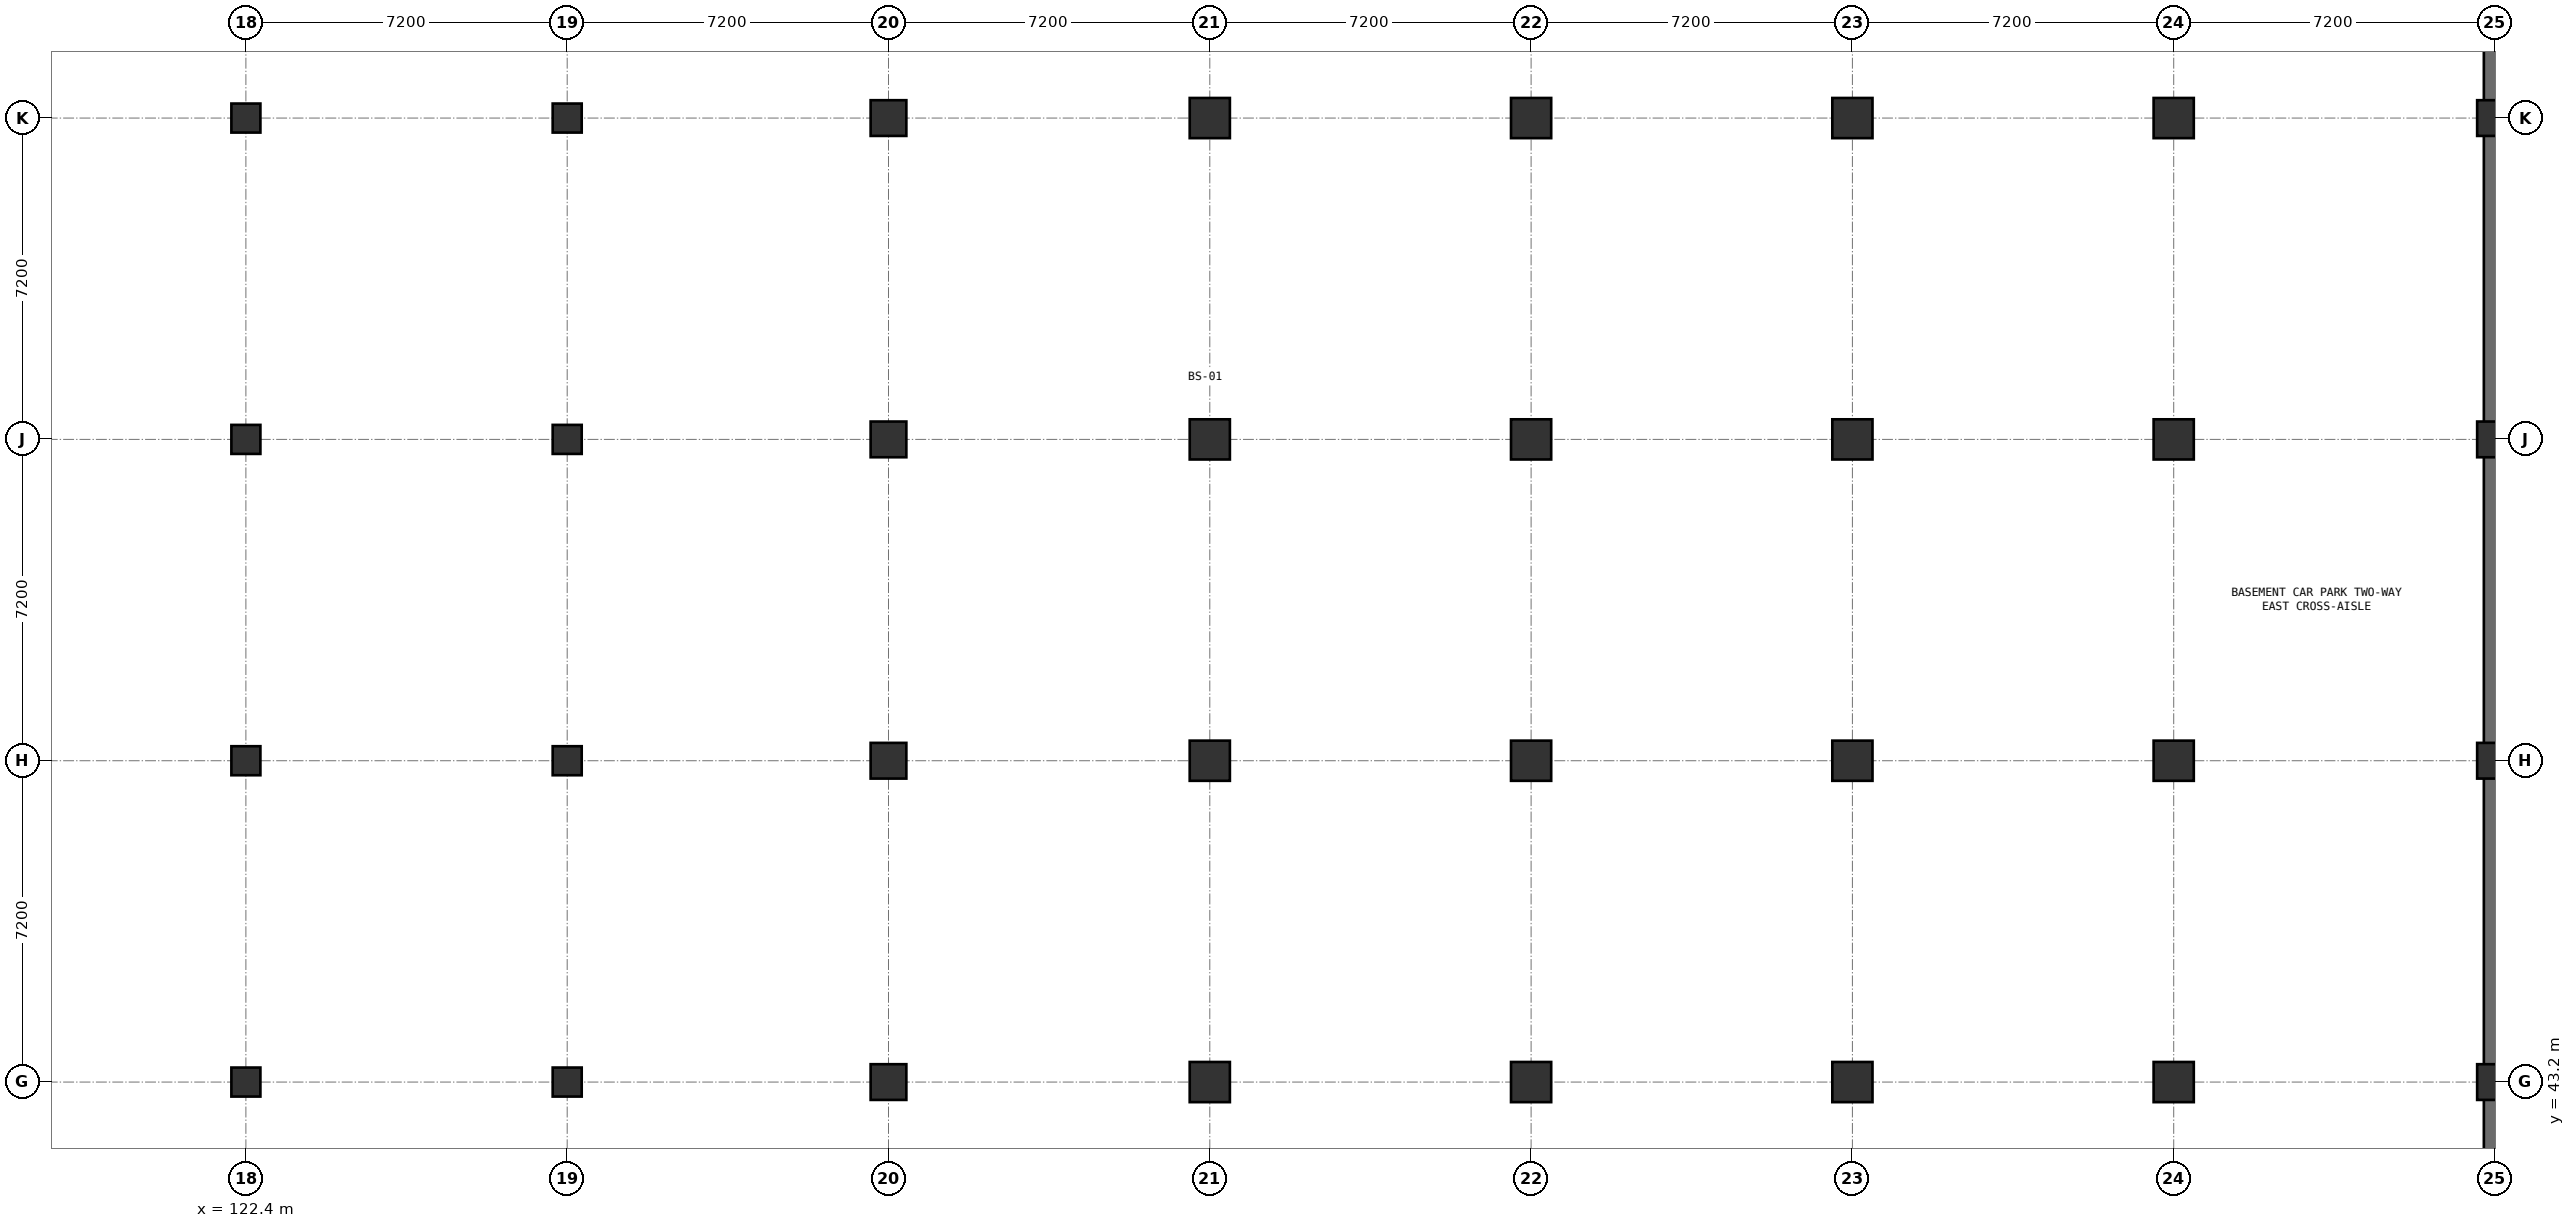
"""IFC4 building model, lengths in metres.
Left out: names, types, materials, properties, quantities, classifications, styles, units other than length and angle.
Written with IfcOpenShell. Run it as: python <this file> out.ifc"""

import sys

from ifc_helpers import new_model, si_unit, direction, frame, frame_2d, origin, origin_2d, place, context, subcontext, project, spatial, rectangle, extrude, element, save


model = new_model("IFC4")
c1 = context("Model", 3, precision=1e-05, world=origin(), true_north=direction((0.0, 1.0)))
c2 = subcontext(c1, "Body", "Model", "MODEL_VIEW")
j1 = project(units=[si_unit("LENGTHUNIT", "METRE"), si_unit("PLANEANGLEUNIT", "RADIAN")], contexts=[c1])
p1 = place(None, origin())
s1 = spatial("IfcSite", under=j1, at=p1, CompositionType="ELEMENT")
p2 = place(p1, origin())
s2 = spatial("IfcBuilding", under=s1, at=p2, CompositionType="ELEMENT")
p3 = place(p2, frame((0.0, 0.0, -4.8)))
s3 = spatial("IfcBuildingStorey", under=s2, at=p3, CompositionType="ELEMENT", Elevation=-4.8)
for number, where, z_axis, x_axis in (
    (1, (136.8, 43.2, 0.0), (0.0, 0.0, 1.0), (1.0, 0.0, 0.0)),
    (2, (136.8, 50.4, 0.0), (0.0, 0.0, 1.0), (1.0, 0.0, 0.0)),
    (3, (136.8, 57.6, 0.0), (0.0, 0.0, 1.0), (1.0, 0.0, 0.0)),
    (4, (136.8, 64.8, 0.0), (0.0, 0.0, 1.0), (1.0, 0.0, 0.0)),
):
    element("IfcColumn", number, at=place(p3, frame(where, z_axis=z_axis, x_axis=x_axis)), inside=s3, PredefinedType="COLUMN", context=c2, shape_type="SweptSolid", body=[
        extrude(rectangle(XDim=0.8, YDim=0.8, at=origin_2d()), origin(), (0.0, 0.0, 1.0), 4.8),
    ])
for number, where, z_axis, x_axis in (
    (5, (144.0, 43.2, 0.0), (0.0, 0.0, 1.0), (1.0, 0.0, 0.0)),
    (6, (144.0, 50.4, 0.0), (0.0, 0.0, 1.0), (1.0, 0.0, 0.0)),
    (7, (144.0, 57.6, 0.0), (0.0, 0.0, 1.0), (1.0, 0.0, 0.0)),
    (8, (144.0, 64.8, 0.0), (0.0, 0.0, 1.0), (1.0, 0.0, 0.0)),
    (9, (151.2, 43.2, 0.0), (0.0, 0.0, 1.0), (1.0, 0.0, 0.0)),
    (10, (151.2, 50.4, 0.0), (0.0, 0.0, 1.0), (1.0, 0.0, 0.0)),
    (11, (151.2, 57.6, 0.0), (0.0, 0.0, 1.0), (1.0, 0.0, 0.0)),
    (12, (151.2, 64.8, 0.0), (0.0, 0.0, 1.0), (1.0, 0.0, 0.0)),
    (13, (158.4, 43.2, 0.0), (0.0, 0.0, 1.0), (1.0, 0.0, 0.0)),
    (14, (158.4, 50.4, 0.0), (0.0, 0.0, 1.0), (1.0, 0.0, 0.0)),
    (15, (158.4, 57.6, 0.0), (0.0, 0.0, 1.0), (1.0, 0.0, 0.0)),
    (16, (158.4, 64.8, 0.0), (0.0, 0.0, 1.0), (1.0, 0.0, 0.0)),
    (17, (165.6, 43.2, 0.0), (0.0, 0.0, 1.0), (1.0, 0.0, 0.0)),
    (18, (165.6, 50.4, 0.0), (0.0, 0.0, 1.0), (1.0, 0.0, 0.0)),
    (19, (165.6, 57.6, 0.0), (0.0, 0.0, 1.0), (1.0, 0.0, 0.0)),
    (20, (165.6, 64.8, 0.0), (0.0, 0.0, 1.0), (1.0, 0.0, 0.0)),
):
    element("IfcColumn", number, at=place(p3, frame(where, z_axis=z_axis, x_axis=x_axis)), inside=s3, PredefinedType="COLUMN", context=c2, shape_type="SweptSolid", body=[
        extrude(rectangle(XDim=0.9, YDim=0.9, at=origin_2d()), origin(), (0.0, 0.0, 1.0), 4.8),
    ])
for number, where, z_axis, x_axis in (
    (21, (172.8, 43.2, 0.0), (0.0, 0.0, 1.0), (1.0, 0.0, 0.0)),
    (22, (172.8, 50.4, 0.0), (0.0, 0.0, 1.0), (1.0, 0.0, 0.0)),
    (23, (172.8, 57.6, 0.0), (0.0, 0.0, 1.0), (1.0, 0.0, 0.0)),
    (24, (172.8, 64.8, 0.0), (0.0, 0.0, 1.0), (1.0, 0.0, 0.0)),
):
    element("IfcColumn", number, at=place(p3, frame(where, z_axis=z_axis, x_axis=x_axis)), inside=s3, PredefinedType="COLUMN", context=c2, shape_type="SweptSolid", body=[
        extrude(rectangle(XDim=0.8, YDim=0.8, at=origin_2d()), origin(), (0.0, 0.0, 1.0), 4.8),
    ])
for number, where, z_axis, x_axis in (
    (25, (122.4, 43.2, 0.0), (0.0, 0.0, 1.0), (1.0, 0.0, 0.0)),
    (26, (122.4, 50.4, 0.0), (0.0, 0.0, 1.0), (1.0, 0.0, 0.0)),
    (27, (122.4, 57.6, 0.0), (0.0, 0.0, 1.0), (1.0, 0.0, 0.0)),
    (28, (122.4, 64.8, 0.0), (0.0, 0.0, 1.0), (1.0, 0.0, 0.0)),
    (29, (129.6, 43.2, 0.0), (0.0, 0.0, 1.0), (1.0, 0.0, 0.0)),
    (30, (129.6, 50.4, 0.0), (0.0, 0.0, 1.0), (1.0, 0.0, 0.0)),
    (31, (129.6, 57.6, 0.0), (0.0, 0.0, 1.0), (1.0, 0.0, 0.0)),
    (32, (129.6, 64.8, 0.0), (0.0, 0.0, 1.0), (1.0, 0.0, 0.0)),
):
    element("IfcColumn", number, at=place(p3, frame(where, z_axis=z_axis, x_axis=x_axis)), inside=s3, PredefinedType="COLUMN", context=c2, shape_type="SweptSolid", body=[
        extrude(rectangle(XDim=0.65, YDim=0.65, at=origin_2d()), origin(), (0.0, 0.0, 1.0), 4.8),
    ])
p4 = place(p3, frame((172.8, 85.95, 0.0), z_axis=(0.0, 0.0, 1.0), x_axis=(0.0, -1.0, 0.0)))
e33 = element("IfcWall", 33, at=p4, inside=s3, PredefinedType="STANDARD", context=c2, shape_type="SweptSolid", body=[
    extrude(rectangle(XDim=63.9, YDim=0.5, at=frame_2d((31.95, 0.0))), origin(), (0.0, 0.0, 1.0), 4.8),
])
save(model, sys.argv[1])
